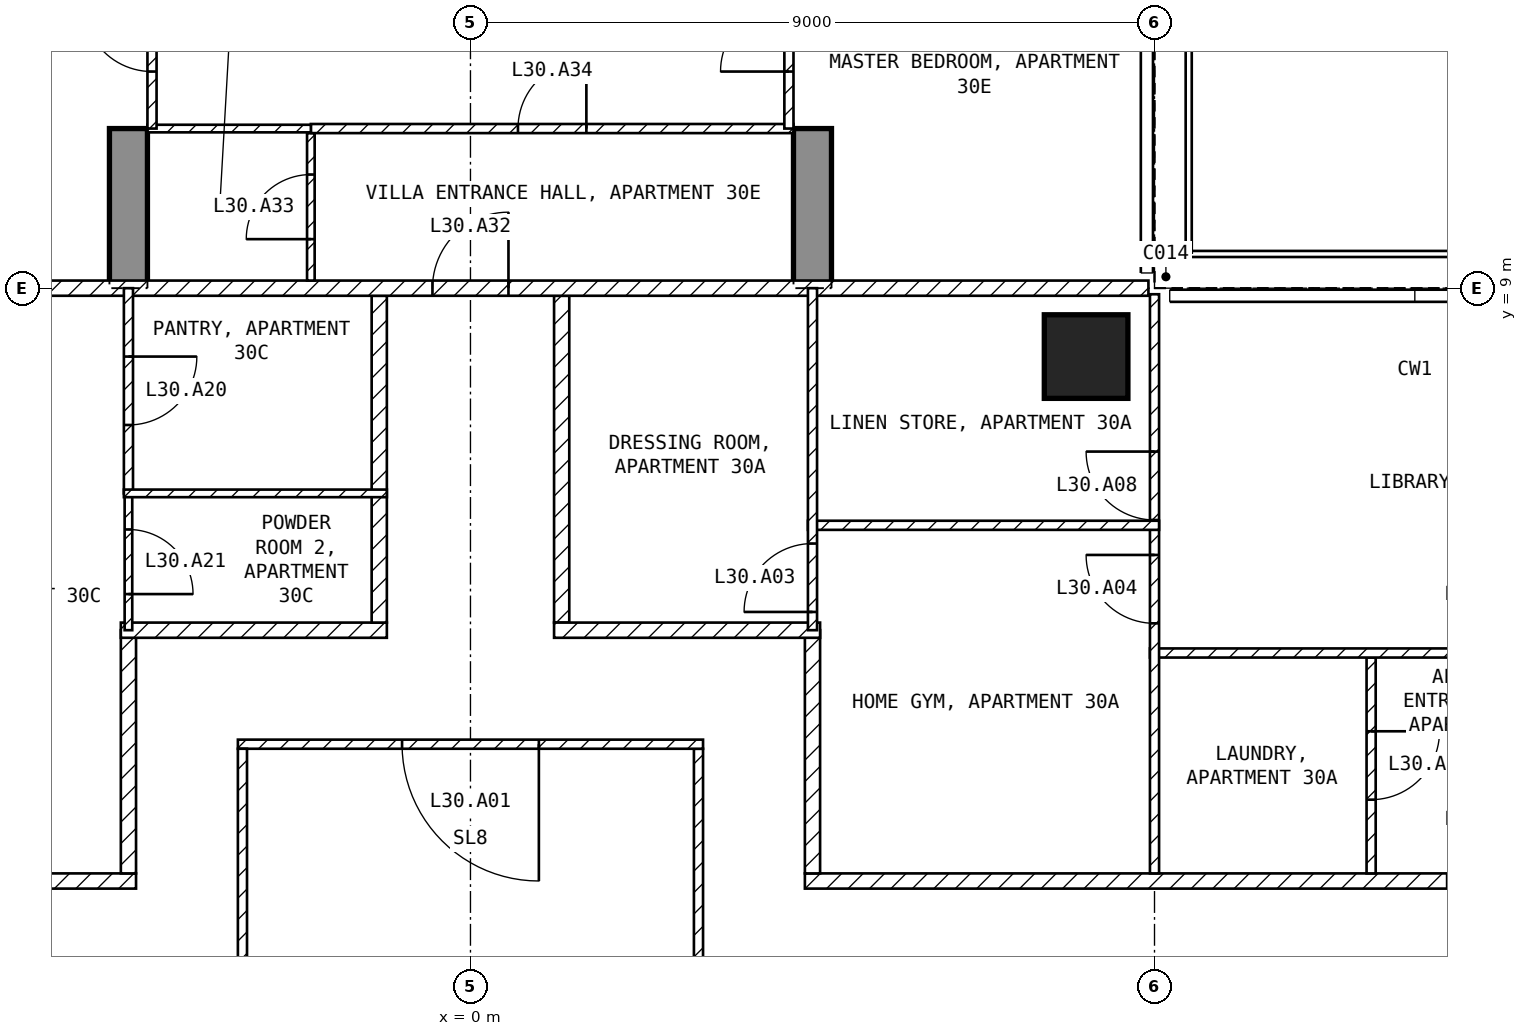
"""IFC4 building model, lengths in metres.
Left out: names, types, materials, properties, quantities, classifications, styles, units other than length and angle.
Written with IfcOpenShell. Run it as: python <this file> out.ifc"""

import sys

from ifc_helpers import new_model, si_unit, direction, frame, frame_2d, origin, origin_2d, place, context, subcontext, project, spatial, polyline, rectangle, outline, extrude, element, fill, save


model = new_model("IFC4")
c1 = context("Model", 3, precision=1e-05, world=origin(), true_north=direction((0.0, 1.0)))
c2 = subcontext(c1, "Body", "Model", "MODEL_VIEW")
j1 = project(units=[si_unit("LENGTHUNIT", "METRE"), si_unit("PLANEANGLEUNIT", "RADIAN")], contexts=[c1])
p1 = place(None, origin())
s1 = spatial("IfcSite", under=j1, at=p1, CompositionType="ELEMENT")
p2 = place(p1, origin())
s2 = spatial("IfcBuilding", under=s1, at=p2, CompositionType="ELEMENT")
p3 = place(p2, frame((0.0, 0.0, 126.9)))
s3 = spatial("IfcBuildingStorey", under=s2, at=p3, CompositionType="ELEMENT", Elevation=126.9)
p4 = place(p3, frame((8.1, 8.1, -0.25), z_axis=(0.0, 0.0, 1.0), x_axis=(1.0, 0.0, 0.0)))
e1 = element("IfcColumn", 1, at=p4, inside=s3, PredefinedType="COLUMN", context=c2, shape_type="SweptSolid", body=[
    extrude(rectangle(XDim=1.1, YDim=1.1, at=origin_2d()), origin(), (0.0, 0.0, 1.0), 3.5),
])
for number, where, z_axis, x_axis in (
    (2, (-4.75, 9.0, -0.25), (1.0, 0.0, 0.0), (0.0, 1.0, 0.0)),
    (3, (4.25, 9.0, -0.25), (1.0, 0.0, 0.0), (0.0, 1.0, 0.0)),
):
    element("IfcWall", number, at=place(p3, frame(where, z_axis=z_axis, x_axis=x_axis)), inside=s3, PredefinedType="SHEAR", context=c2, shape_type="SweptSolid", body=[
        extrude(outline(polyline([(0.0, 0.0), (2.1, 0.0), (2.1, 2.65), (4.5, 2.65), (4.5, 0.0), (9.9, 0.0), (9.9, 2.65), (12.3, 2.65), (12.3, 0.0), (16.55, 0.0), (16.55, 3.5), (0.0, 3.5), (0.0, 0.0)])), origin(), (0.0, 0.0, 1.0), 0.5),
    ])
p5 = place(p3, frame((3.0, -2.94, 0.0), z_axis=(0.0, 0.0, 1.0), x_axis=(0.0, 1.0, 0.0)))
e4 = element("IfcWall", 4, at=p5, inside=s3, PredefinedType="PARTITIONING", context=c2, shape_type="SweptSolid", body=[
    extrude(rectangle(XDim=5.88, YDim=0.12, at=frame_2d((2.94, 0.0))), origin(), (0.0, 0.0, 1.0), 3.25),
])
p6 = place(p3, frame((3.06, 3.0, 0.0), z_axis=(0.0, 0.0, 1.0), x_axis=(-1.0, 0.0, 0.0)))
e5 = element("IfcWall", 5, at=p6, inside=s3, PredefinedType="PARTITIONING", context=c2, shape_type="SweptSolid", body=[
    extrude(rectangle(XDim=6.12, YDim=0.12, at=frame_2d((3.06, 0.0))), origin(), (0.0, 0.0, 1.0), 3.25),
])
p7 = place(p6, frame((2.16, 0.0, 0.0)))
e6 = element("IfcOpeningElement", 6, at=p7, cuts=e5, PredefinedType="OPENING", context=c2, shape_type="SweptSolid", body=[
    extrude(rectangle(XDim=1.8, YDim=2.1, at=frame_2d((0.9, 1.05))), frame((0.0, 0.07, 0.0), z_axis=(0.0, -1.0, 0.0), x_axis=(1.0, 0.0, 0.0)), (0.0, 0.0, 1.0), 0.14),
])
p8 = place(p3, frame((-3.0, 2.94, 0.0), z_axis=(0.0, 0.0, 1.0), x_axis=(0.0, -1.0, 0.0)))
e7 = element("IfcWall", 7, at=p8, inside=s3, PredefinedType="PARTITIONING", context=c2, shape_type="SweptSolid", body=[
    extrude(rectangle(XDim=5.88, YDim=0.12, at=frame_2d((2.94, 0.0))), origin(), (0.0, 0.0, 1.0), 3.25),
])
p9 = place(p3, frame((4.4, 1.2, 0.0), z_axis=(0.0, 0.0, 1.0), x_axis=(1.0, 0.0, 0.0)))
e8 = element("IfcWall", 8, at=p9, inside=s3, PredefinedType="PARTITIONING", context=c2, shape_type="SweptSolid", body=[
    extrude(rectangle(XDim=17.2, YDim=0.2, at=frame_2d((8.6, 0.0))), origin(), (0.0, 0.0, 1.0), 3.25),
])
p10 = place(p9, frame((8.45, 0.0, 0.0)))
e9 = element("IfcOpeningElement", 9, at=p10, cuts=e8, PredefinedType="OPENING", context=c2, shape_type="SweptSolid", body=[
    extrude(rectangle(XDim=1.0, YDim=2.1, at=frame_2d((0.5, 1.05))), frame((0.0, 0.11, 0.0), z_axis=(0.0, -1.0, 0.0), x_axis=(1.0, 0.0, 0.0)), (0.0, 0.0, 1.0), 0.22),
])
p11 = place(p3, frame((4.5, 4.5, 0.0), z_axis=(0.0, 0.0, 1.0), x_axis=(0.0, -1.0, 0.0)))
e10 = element("IfcWall", 10, at=p11, inside=s3, PredefinedType="PARTITIONING", context=c2, shape_type="SweptSolid", body=[
    extrude(rectangle(XDim=3.2, YDim=0.2, at=frame_2d((1.6, 0.0))), origin(), (0.0, 0.0, 1.0), 3.25),
])
p12 = place(p3, frame((1.2, 8.9, 0.0), z_axis=(0.0, 0.0, 1.0), x_axis=(0.0, -1.0, 0.0)))
e11 = element("IfcWall", 11, at=p12, inside=s3, PredefinedType="PARTITIONING", context=c2, shape_type="SweptSolid", body=[
    extrude(rectangle(XDim=4.3, YDim=0.2, at=frame_2d((2.15, 0.0))), origin(), (0.0, 0.0, 1.0), 3.25),
])
p13 = place(p3, frame((1.1, 4.5, 0.0), z_axis=(0.0, 0.0, 1.0), x_axis=(1.0, 0.0, 0.0)))
e12 = element("IfcWall", 12, at=p13, inside=s3, PredefinedType="PARTITIONING", context=c2, shape_type="SweptSolid", body=[
    extrude(rectangle(XDim=3.5, YDim=0.2, at=frame_2d((1.75, 0.0))), origin(), (0.0, 0.0, 1.0), 3.25),
])
p14 = place(p3, frame((-21.6, 1.2, 0.0), z_axis=(0.0, 0.0, 1.0), x_axis=(1.0, 0.0, 0.0)))
e13 = element("IfcWall", 13, at=p14, inside=s3, PredefinedType="PARTITIONING", context=c2, shape_type="SweptSolid", body=[
    extrude(rectangle(XDim=17.2, YDim=0.2, at=frame_2d((8.6, 0.0))), origin(), (0.0, 0.0, 1.0), 3.25),
])
p15 = place(p14, frame((10.9, 0.0, 0.0)))
e14 = element("IfcOpeningElement", 14, at=p15, cuts=e13, PredefinedType="OPENING", context=c2, shape_type="SweptSolid", body=[
    extrude(rectangle(XDim=1.0, YDim=2.1, at=frame_2d((0.5, 1.05))), frame((0.0, 0.11, 0.0), z_axis=(0.0, -1.0, 0.0), x_axis=(1.0, 0.0, 0.0)), (0.0, 0.0, 1.0), 0.22),
])
p16 = place(p3, frame((-4.5, 1.3, 0.0), z_axis=(0.0, 0.0, 1.0), x_axis=(0.0, 1.0, 0.0)))
e15 = element("IfcWall", 15, at=p16, inside=s3, PredefinedType="PARTITIONING", context=c2, shape_type="SweptSolid", body=[
    extrude(rectangle(XDim=3.2, YDim=0.2, at=frame_2d((1.6, 0.0))), origin(), (0.0, 0.0, 1.0), 3.25),
])
p17 = place(p3, frame((-4.6, 4.5, 0.0), z_axis=(0.0, 0.0, 1.0), x_axis=(1.0, 0.0, 0.0)))
e16 = element("IfcWall", 16, at=p17, inside=s3, PredefinedType="PARTITIONING", context=c2, shape_type="SweptSolid", body=[
    extrude(rectangle(XDim=3.5, YDim=0.2, at=frame_2d((1.75, 0.0))), origin(), (0.0, 0.0, 1.0), 3.25),
])
p18 = place(p3, frame((-1.2, 4.6, 0.0), z_axis=(0.0, 0.0, 1.0), x_axis=(0.0, 1.0, 0.0)))
e17 = element("IfcWall", 17, at=p18, inside=s3, PredefinedType="PARTITIONING", context=c2, shape_type="SweptSolid", body=[
    extrude(rectangle(XDim=4.3, YDim=0.2, at=frame_2d((2.15, 0.0))), origin(), (0.0, 0.0, 1.0), 3.25),
])
p19 = place(p3, frame((-8.92, 9.0, 0.0), z_axis=(0.0, 0.0, 1.0), x_axis=(1.0, 0.0, 0.0)))
e18 = element("IfcWall", 18, at=p19, inside=s3, PredefinedType="PARTITIONING", context=c2, shape_type="SweptSolid", body=[
    extrude(rectangle(XDim=17.84, YDim=0.2, at=frame_2d((8.92, 0.0))), origin(), (0.0, 0.0, 1.0), 3.25),
])
p20 = place(p19, frame((8.42, 0.0, 0.0)))
e19 = element("IfcOpeningElement", 19, at=p20, cuts=e18, PredefinedType="OPENING", context=c2, shape_type="SweptSolid", body=[
    extrude(rectangle(XDim=1.0, YDim=2.1, at=frame_2d((0.5, 1.05))), frame((0.0, 0.11, 0.0), z_axis=(0.0, -1.0, 0.0), x_axis=(1.0, 0.0, 0.0)), (0.0, 0.0, 1.0), 0.22),
])
p21 = place(p3, frame((11.85, 4.14, 0.0), z_axis=(0.0, 0.0, 1.0), x_axis=(0.0, -1.0, 0.0)))
e20 = element("IfcWall", 20, at=p21, inside=s3, PredefinedType="PARTITIONING", context=c2, shape_type="SweptSolid", body=[
    extrude(rectangle(XDim=2.84, YDim=0.12, at=frame_2d((1.42, 0.0))), origin(), (0.0, 0.0, 1.0), 3.25),
])
p22 = place(p21, frame((0.97, 0.0, 0.0)))
e21 = element("IfcOpeningElement", 21, at=p22, cuts=e20, PredefinedType="OPENING", context=c2, shape_type="SweptSolid", body=[
    extrude(rectangle(XDim=0.9, YDim=2.1, at=frame_2d((0.45, 1.05))), frame((0.0, 0.07, 0.0), z_axis=(0.0, -1.0, 0.0), x_axis=(1.0, 0.0, 0.0)), (0.0, 0.0, 1.0), 0.14),
])
p23 = place(p3, frame((8.94, 4.2, 0.0), z_axis=(0.0, 0.0, 1.0), x_axis=(1.0, 0.0, 0.0)))
e22 = element("IfcWall", 22, at=p23, inside=s3, PredefinedType="PARTITIONING", context=c2, shape_type="SweptSolid", body=[
    extrude(rectangle(XDim=10.71, YDim=0.12, at=frame_2d((5.355, 0.0))), origin(), (0.0, 0.0, 1.0), 3.25),
])
p24 = place(p23, frame((3.96, 0.0, 0.0)))
e23 = element("IfcOpeningElement", 23, at=p24, cuts=e22, PredefinedType="OPENING", context=c2, shape_type="SweptSolid", body=[
    extrude(rectangle(XDim=0.9, YDim=2.1, at=frame_2d((0.45, 1.05))), frame((0.0, 0.07, 0.0), z_axis=(0.0, -1.0, 0.0), x_axis=(1.0, 0.0, 0.0)), (0.0, 0.0, 1.0), 0.14),
])
p25 = place(p3, frame((9.0, 1.3, 0.0), z_axis=(0.0, 0.0, 1.0), x_axis=(0.0, 1.0, 0.0)))
e24 = element("IfcWall", 24, at=p25, inside=s3, PredefinedType="PARTITIONING", context=c2, shape_type="SweptSolid", body=[
    extrude(rectangle(XDim=7.62, YDim=0.12, at=frame_2d((3.81, 0.0))), origin(), (0.0, 0.0, 1.0), 3.25),
])
p26 = place(p25, frame((3.29, 0.0, 0.0)))
e25 = element("IfcOpeningElement", 25, at=p26, cuts=e24, PredefinedType="OPENING", context=c2, shape_type="SweptSolid", body=[
    extrude(rectangle(XDim=0.9, YDim=2.1, at=frame_2d((0.45, 1.05))), frame((0.0, 0.07, 0.0), z_axis=(0.0, -1.0, 0.0), x_axis=(1.0, 0.0, 0.0)), (0.0, 0.0, 1.0), 0.14),
])
p27 = place(p25, frame((4.65, 0.0, 0.0)))
e26 = element("IfcOpeningElement", 26, at=p27, cuts=e24, PredefinedType="OPENING", context=c2, shape_type="SweptSolid", body=[
    extrude(rectangle(XDim=0.9, YDim=2.1, at=frame_2d((0.45, 1.05))), frame((0.0, 0.07, 0.0), z_axis=(0.0, -1.0, 0.0), x_axis=(1.0, 0.0, 0.0)), (0.0, 0.0, 1.0), 0.14),
])
p28 = place(p3, frame((4.44, 5.88, 0.0), z_axis=(0.0, 0.0, 1.0), x_axis=(1.0, 0.0, 0.0)))
e27 = element("IfcWall", 27, at=p28, inside=s3, PredefinedType="PARTITIONING", context=c2, shape_type="SweptSolid", body=[
    extrude(rectangle(XDim=4.62, YDim=0.12, at=frame_2d((2.31, 0.0))), origin(), (0.0, 0.0, 1.0), 3.25),
])
p29 = place(p3, frame((4.5, 4.5, 0.0), z_axis=(0.0, 0.0, 1.0), x_axis=(0.0, 1.0, 0.0)))
e28 = element("IfcWall", 28, at=p29, inside=s3, PredefinedType="PARTITIONING", context=c2, shape_type="SweptSolid", body=[
    extrude(rectangle(XDim=4.5, YDim=0.12, at=frame_2d((2.25, 0.0))), origin(), (0.0, 0.0, 1.0), 3.25),
])
p30 = place(p29, frame((0.24, 0.0, 0.0)))
e29 = element("IfcOpeningElement", 29, at=p30, cuts=e28, PredefinedType="OPENING", context=c2, shape_type="SweptSolid", body=[
    extrude(rectangle(XDim=0.9, YDim=2.1, at=frame_2d((0.45, 1.05))), frame((0.0, 0.07, 0.0), z_axis=(0.0, -1.0, 0.0), x_axis=(1.0, 0.0, 0.0)), (0.0, 0.0, 1.0), 0.14),
])
p31 = place(p3, frame((-4.5, 6.3, 0.0), z_axis=(0.0, 0.0, 1.0), x_axis=(0.0, -1.0, 0.0)))
e30 = element("IfcWall", 30, at=p31, inside=s3, PredefinedType="PARTITIONING", context=c2, shape_type="SweptSolid", body=[
    extrude(rectangle(XDim=1.8, YDim=0.1, at=frame_2d((0.9, 0.0))), origin(), (0.0, 0.0, 1.0), 3.25),
])
p32 = place(p31, frame((0.475, 0.0, 0.0)))
e31 = element("IfcOpeningElement", 31, at=p32, cuts=e30, PredefinedType="OPENING", context=c2, shape_type="SweptSolid", body=[
    extrude(rectangle(XDim=0.85, YDim=2.1, at=frame_2d((0.425, 1.05))), frame((0.0, 0.06, 0.0), z_axis=(0.0, -1.0, 0.0), x_axis=(1.0, 0.0, 0.0)), (0.0, 0.0, 1.0), 0.12),
])
p33 = place(p3, frame((-4.5, 9.0, 0.0), z_axis=(0.0, 0.0, 1.0), x_axis=(0.0, -1.0, 0.0)))
e32 = element("IfcWall", 32, at=p33, inside=s3, PredefinedType="PARTITIONING", context=c2, shape_type="SweptSolid", body=[
    extrude(rectangle(XDim=2.7, YDim=0.12, at=frame_2d((1.35, 0.0))), origin(), (0.0, 0.0, 1.0), 3.25),
])
p34 = place(p33, frame((0.9, 0.0, 0.0)))
e33 = element("IfcOpeningElement", 33, at=p34, cuts=e32, PredefinedType="OPENING", context=c2, shape_type="SweptSolid", body=[
    extrude(rectangle(XDim=0.9, YDim=2.1, at=frame_2d((0.45, 1.05))), frame((0.0, 0.07, 0.0), z_axis=(0.0, -1.0, 0.0), x_axis=(1.0, 0.0, 0.0)), (0.0, 0.0, 1.0), 0.14),
])
p35 = place(p3, frame((-4.56, 6.3, 0.0), z_axis=(0.0, 0.0, 1.0), x_axis=(1.0, 0.0, 0.0)))
e34 = element("IfcWall", 34, at=p35, inside=s3, PredefinedType="PARTITIONING", context=c2, shape_type="SweptSolid", body=[
    extrude(rectangle(XDim=3.46, YDim=0.1, at=frame_2d((1.73, 0.0))), origin(), (0.0, 0.0, 1.0), 3.25),
])
p36 = place(p3, frame((-2.1, 9.1, 0.0), z_axis=(0.0, 0.0, 1.0), x_axis=(0.0, 1.0, 0.0)))
e35 = element("IfcWall", 35, at=p36, inside=s3, PredefinedType="PARTITIONING", context=c2, shape_type="SweptSolid", body=[
    extrude(rectangle(XDim=1.94, YDim=0.1, at=frame_2d((0.97, 0.0))), origin(), (0.0, 0.0, 1.0), 3.25),
])
p37 = place(p36, frame((0.545, 0.0, 0.0)))
e36 = element("IfcOpeningElement", 36, at=p37, cuts=e35, PredefinedType="OPENING", context=c2, shape_type="SweptSolid", body=[
    extrude(rectangle(XDim=0.85, YDim=2.1, at=frame_2d((0.425, 1.05))), frame((0.0, 0.06, 0.0), z_axis=(0.0, -1.0, 0.0), x_axis=(1.0, 0.0, 0.0)), (0.0, 0.0, 1.0), 0.12),
])
p38 = place(p3, frame((-2.1, 11.1, 0.0), z_axis=(0.0, 0.0, 1.0), x_axis=(1.0, 0.0, 0.0)))
e37 = element("IfcWall", 37, at=p38, inside=s3, PredefinedType="PARTITIONING", context=c2, shape_type="SweptSolid", body=[
    extrude(rectangle(XDim=6.35, YDim=0.12, at=frame_2d((3.175, 0.0))), origin(), (0.0, 0.0, 1.0), 3.25),
])
p39 = place(p38, frame((2.725, 0.0, 0.0)))
e38 = element("IfcOpeningElement", 38, at=p39, cuts=e37, PredefinedType="OPENING", context=c2, shape_type="SweptSolid", body=[
    extrude(rectangle(XDim=0.9, YDim=2.1, at=frame_2d((0.45, 1.05))), frame((0.0, 0.07, 0.0), z_axis=(0.0, -1.0, 0.0), x_axis=(1.0, 0.0, 0.0)), (0.0, 0.0, 1.0), 0.14),
])
p40 = place(p3, frame((-4.25, 11.1, 0.0), z_axis=(0.0, 0.0, 1.0), x_axis=(1.0, 0.0, 0.0)))
e39 = element("IfcWall", 39, at=p40, inside=s3, PredefinedType="PARTITIONING", context=c2, shape_type="SweptSolid", body=[
    extrude(rectangle(XDim=2.15, YDim=0.1, at=frame_2d((1.075, 0.0))), origin(), (0.0, 0.0, 1.0), 3.25),
])
p41 = place(p3, frame((4.19, 11.1, 0.0), z_axis=(0.0, 0.0, 1.0), x_axis=(0.0, 1.0, 0.0)))
e40 = element("IfcWall", 40, at=p41, inside=s3, PredefinedType="PARTITIONING", context=c2, shape_type="SweptSolid", body=[
    extrude(rectangle(XDim=2.4, YDim=0.12, at=frame_2d((1.2, 0.0))), origin(), (0.0, 0.0, 1.0), 2.4),
])
p42 = place(p41, frame((0.75, 0.0, 0.0)))
e41 = element("IfcOpeningElement", 41, at=p42, cuts=e40, PredefinedType="OPENING", context=c2, shape_type="SweptSolid", body=[
    extrude(rectangle(XDim=0.9, YDim=2.1, at=frame_2d((0.45, 1.05))), frame((0.0, 0.07, 0.0), z_axis=(0.0, -1.0, 0.0), x_axis=(1.0, 0.0, 0.0)), (0.0, 0.0, 1.0), 0.14),
])
p43 = place(p3, frame((-4.19, 11.1, 0.0), z_axis=(0.0, 0.0, 1.0), x_axis=(0.0, 1.0, 0.0)))
e42 = element("IfcWall", 42, at=p43, inside=s3, PredefinedType="PARTITIONING", context=c2, shape_type="SweptSolid", body=[
    extrude(rectangle(XDim=2.4, YDim=0.12, at=frame_2d((1.2, 0.0))), origin(), (0.0, 0.0, 1.0), 2.4),
])
p44 = place(p43, frame((0.75, 0.0, 0.0)))
e43 = element("IfcOpeningElement", 43, at=p44, cuts=e42, PredefinedType="OPENING", context=c2, shape_type="SweptSolid", body=[
    extrude(rectangle(XDim=0.9, YDim=2.1, at=frame_2d((0.45, 1.05))), frame((0.0, 0.07, 0.0), z_axis=(0.0, -1.0, 0.0), x_axis=(1.0, 0.0, 0.0)), (0.0, 0.0, 1.0), 0.14),
])
p45 = place(p7, origin())
e44 = element("IfcDoor", 44, at=p45, inside=s3, OperationType="SINGLE_SWING_LEFT", PredefinedType="DOOR", context=c2, shape_type="SweptSolid", body=[
    extrude(rectangle(XDim=1.8, YDim=2.1, at=frame_2d((0.9, 1.05))), frame((0.0, 0.025, 0.0), z_axis=(0.0, -1.0, 0.0), x_axis=(1.0, 0.0, 0.0)), (0.0, 0.0, 1.0), 0.05),
])
fill(e6, e44)
p46 = place(p30, origin())
e45 = element("IfcDoor", 45, at=p46, inside=s3, OperationType="SINGLE_SWING_LEFT", PredefinedType="DOOR", context=c2, shape_type="SweptSolid", body=[
    extrude(rectangle(XDim=0.9, YDim=2.1, at=frame_2d((0.45, 1.05))), frame((0.0, 0.025, 0.0), z_axis=(0.0, -1.0, 0.0), x_axis=(1.0, 0.0, 0.0)), (0.0, 0.0, 1.0), 0.05),
])
fill(e29, e45)
p47 = place(p26, origin())
e46 = element("IfcDoor", 46, at=p47, inside=s3, OperationType="SINGLE_SWING_RIGHT", PredefinedType="DOOR", context=c2, shape_type="SweptSolid", body=[
    extrude(rectangle(XDim=0.9, YDim=2.1, at=frame_2d((0.45, 1.05))), frame((0.0, 0.025, 0.0), z_axis=(0.0, -1.0, 0.0), x_axis=(1.0, 0.0, 0.0)), (0.0, 0.0, 1.0), 0.05),
])
fill(e25, e46)
p48 = place(p22, origin())
e47 = element("IfcDoor", 47, at=p48, inside=s3, OperationType="SINGLE_SWING_LEFT", PredefinedType="DOOR", context=c2, shape_type="SweptSolid", body=[
    extrude(rectangle(XDim=0.9, YDim=2.1, at=frame_2d((0.45, 1.05))), frame((0.0, 0.025, 0.0), z_axis=(0.0, -1.0, 0.0), x_axis=(1.0, 0.0, 0.0)), (0.0, 0.0, 1.0), 0.05),
])
fill(e21, e47)
p49 = place(p27, origin())
e48 = element("IfcDoor", 48, at=p49, inside=s3, OperationType="SINGLE_SWING_RIGHT", PredefinedType="DOOR", context=c2, shape_type="SweptSolid", body=[
    extrude(rectangle(XDim=0.9, YDim=2.1, at=frame_2d((0.45, 1.05))), frame((0.0, 0.025, 0.0), z_axis=(0.0, -1.0, 0.0), x_axis=(1.0, 0.0, 0.0)), (0.0, 0.0, 1.0), 0.05),
])
fill(e26, e48)
p50 = place(p34, origin())
e49 = element("IfcDoor", 49, at=p50, inside=s3, OperationType="SINGLE_SWING_LEFT", PredefinedType="DOOR", context=c2, shape_type="SweptSolid", body=[
    extrude(rectangle(XDim=0.9, YDim=2.1, at=frame_2d((0.45, 1.05))), frame((0.0, 0.025, 0.0), z_axis=(0.0, -1.0, 0.0), x_axis=(1.0, 0.0, 0.0)), (0.0, 0.0, 1.0), 0.05),
])
fill(e33, e49)
p51 = place(p32, origin())
e50 = element("IfcDoor", 50, at=p51, inside=s3, OperationType="SINGLE_SWING_RIGHT", PredefinedType="DOOR", context=c2, shape_type="SweptSolid", body=[
    extrude(rectangle(XDim=0.85, YDim=2.1, at=frame_2d((0.425, 1.05))), frame((0.0, 0.025, 0.0), z_axis=(0.0, -1.0, 0.0), x_axis=(1.0, 0.0, 0.0)), (0.0, 0.0, 1.0), 0.05),
])
fill(e31, e50)
p52 = place(p20, origin())
e51 = element("IfcDoor", 51, at=p52, inside=s3, OperationType="SINGLE_SWING_RIGHT", PredefinedType="DOOR", context=c2, shape_type="SweptSolid", body=[
    extrude(rectangle(XDim=1.0, YDim=2.1, at=frame_2d((0.5, 1.05))), frame((0.0, 0.025, 0.0), z_axis=(0.0, -1.0, 0.0), x_axis=(1.0, 0.0, 0.0)), (0.0, 0.0, 1.0), 0.05),
])
fill(e19, e51)
p53 = place(p37, origin())
e52 = element("IfcDoor", 52, at=p53, inside=s3, OperationType="SINGLE_SWING_LEFT", PredefinedType="DOOR", context=c2, shape_type="SweptSolid", body=[
    extrude(rectangle(XDim=0.85, YDim=2.1, at=frame_2d((0.425, 1.05))), frame((0.0, 0.025, 0.0), z_axis=(0.0, -1.0, 0.0), x_axis=(1.0, 0.0, 0.0)), (0.0, 0.0, 1.0), 0.05),
])
fill(e36, e52)
p54 = place(p39, origin())
e53 = element("IfcDoor", 53, at=p54, inside=s3, OperationType="SINGLE_SWING_RIGHT", PredefinedType="DOOR", context=c2, shape_type="SweptSolid", body=[
    extrude(rectangle(XDim=0.9, YDim=2.1, at=frame_2d((0.45, 1.05))), frame((0.0, 0.025, 0.0), z_axis=(0.0, -1.0, 0.0), x_axis=(1.0, 0.0, 0.0)), (0.0, 0.0, 1.0), 0.05),
])
fill(e38, e53)
p55 = place(p10, origin())
e54 = element("IfcDoor", 54, at=p55, inside=s3, OperationType="SINGLE_SWING_RIGHT", PredefinedType="DOOR", context=c2, shape_type="SweptSolid", body=[
    extrude(rectangle(XDim=1.0, YDim=2.1, at=frame_2d((0.5, 1.05))), frame((0.0, 0.025, 0.0), z_axis=(0.0, -1.0, 0.0), x_axis=(1.0, 0.0, 0.0)), (0.0, 0.0, 1.0), 0.05),
])
fill(e9, e54)
p56 = place(p42, origin())
e55 = element("IfcDoor", 55, at=p56, inside=s3, OperationType="SINGLE_SWING_LEFT", PredefinedType="DOOR", context=c2, shape_type="SweptSolid", body=[
    extrude(rectangle(XDim=0.9, YDim=2.1, at=frame_2d((0.45, 1.05))), frame((0.0, 0.025, 0.0), z_axis=(0.0, -1.0, 0.0), x_axis=(1.0, 0.0, 0.0)), (0.0, 0.0, 1.0), 0.05),
])
fill(e41, e55)
p57 = place(p44, origin())
e56 = element("IfcDoor", 56, at=p57, inside=s3, OperationType="SINGLE_SWING_RIGHT", PredefinedType="DOOR", context=c2, shape_type="SweptSolid", body=[
    extrude(rectangle(XDim=0.9, YDim=2.1, at=frame_2d((0.45, 1.05))), frame((0.0, 0.025, 0.0), z_axis=(0.0, -1.0, 0.0), x_axis=(1.0, 0.0, 0.0)), (0.0, 0.0, 1.0), 0.05),
])
fill(e43, e56)
save(model, sys.argv[1])
